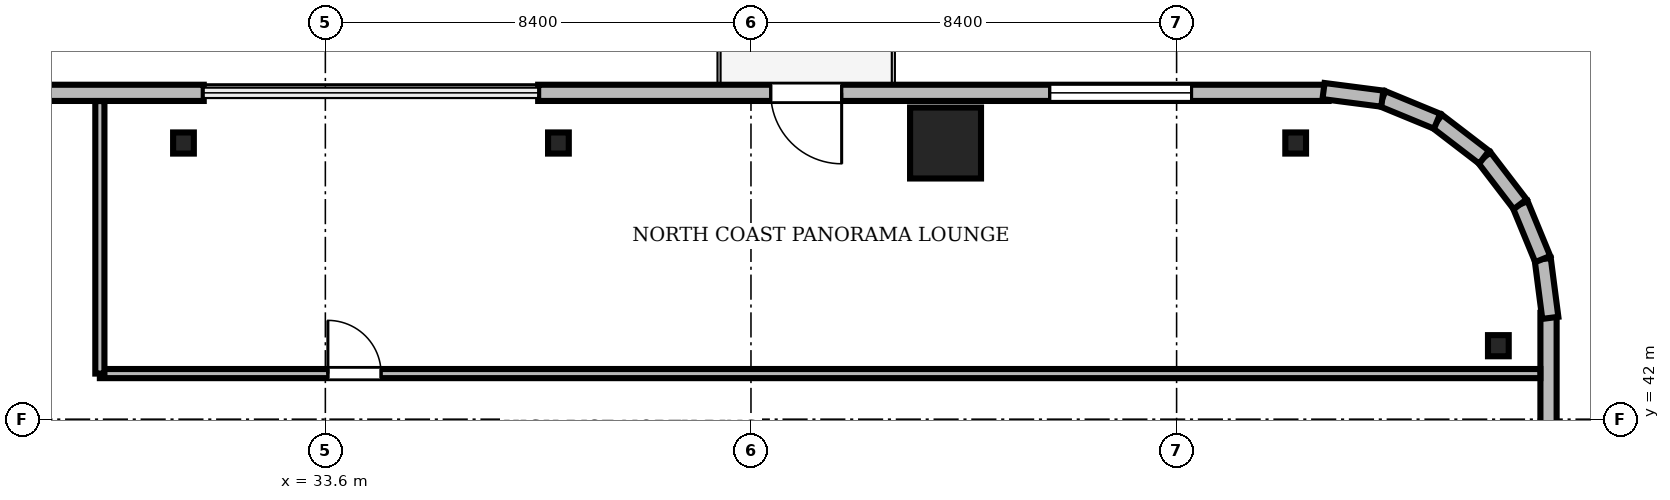
"""IFC4 building model, lengths in metres.
Left out: names, types, materials, properties, quantities, classifications, styles, units other than length and angle.
Written with IfcOpenShell. Run it as: python <this file> out.ifc"""

import sys

from ifc_helpers import new_model, si_unit, direction, frame, frame_2d, origin, origin_2d, place, context, subcontext, project, spatial, rectangle, i_section, extrude, source, transform, mapped, element, fill, save


model = new_model("IFC4")
c1 = context("Model", 3, precision=1e-05, world=origin(), true_north=direction((0.0, 1.0)))
c2 = subcontext(c1, "Body", "Model", "MODEL_VIEW")
j1 = project(units=[si_unit("LENGTHUNIT", "METRE"), si_unit("PLANEANGLEUNIT", "RADIAN")], contexts=[c1])
p1 = place(None, origin())
s1 = spatial("IfcSite", under=j1, at=p1, CompositionType="ELEMENT")
p2 = place(p1, origin())
s2 = spatial("IfcBuilding", under=s1, at=p2, CompositionType="ELEMENT")
p3 = place(p2, frame((0.0, 0.0, 196.05)))
s3 = spatial("IfcBuildingStorey", under=s2, at=p3, CompositionType="ELEMENT", Elevation=196.05)
m1 = source(origin(), c2, "Body", "SweptSolid", [
    extrude(rectangle(XDim=1.4, YDim=1.4, at=origin_2d()), origin(), (0.0, 0.0, 1.0), 3.53),
])
p4 = place(p3, frame((45.84, 47.45, 0.0), z_axis=(0.0, 0.0, 1.0), x_axis=(1.0, 0.0, 0.0)))
e1 = element("IfcColumn", 1, at=p4, inside=s3, PredefinedType="COLUMN", context=c2, shape_type="MappedRepresentation", body=[
    mapped(m1, transform((0.0, 0.0, 0.0), scale=1.0)),
])
m2 = source(origin(), c2, "Body", "SweptSolid", [
    extrude(i_section(OverallWidth=0.409, OverallDepth=0.417, WebThickness=0.021, FlangeThickness=0.033, FilletRadius=0.015, at=origin_2d()), origin(), (0.0, 0.0, 1.0), 3.53),
])
for number, where, z_axis, x_axis in (
    (2, (56.75, 43.45, 0.0), (0.0, 0.0, 1.0), (1.0, 0.0, 0.0)),
    (3, (52.75, 47.45, 0.0), (0.0, 0.0, 1.0), (1.0, 0.0, 0.0)),
    (4, (38.2, 47.45, 0.0), (0.0, 0.0, 1.0), (1.0, 0.0, 0.0)),
    (5, (30.8, 47.45, 0.0), (0.0, 0.0, 1.0), (1.0, 0.0, 0.0)),
):
    element("IfcColumn", number, at=place(p3, frame(where, z_axis=z_axis, x_axis=x_axis)), inside=s3, PredefinedType="COLUMN", context=c2, shape_type="MappedRepresentation", body=[
        mapped(m2, transform((0.0, 0.0, 0.0), scale=1.0)),
    ])
m3 = source(origin(), c2, "Body", "SweptSolid", [
    extrude(rectangle(XDim=15.6, YDim=0.32, at=frame_2d((7.8, 0.0))), origin(), (0.0, 0.0, 1.0), 3.53),
])
p5 = place(p3, frame((53.4, 48.44, 0.0), z_axis=(0.0, 0.0, 1.0), x_axis=(-1.0, 0.0, 0.0)))
e6 = element("IfcWall", 6, at=p5, inside=s3, PredefinedType="SOLIDWALL", context=c2, shape_type="MappedRepresentation", body=[
    mapped(m3, transform((0.0, 0.0, 0.0), scale=1.0)),
])
m4 = source(origin(), c2, "Body", "SweptSolid", [
    extrude(rectangle(XDim=1.4, YDim=2.3, at=frame_2d((0.7, 1.15))), frame((0.0, 0.17, 0.0), z_axis=(0.0, -1.0, 0.0), x_axis=(1.0, 0.0, 0.0)), (0.0, 0.0, 1.0), 0.34),
])
p6 = place(p5, frame((9.61, 0.0, 0.0)))
e7 = element("IfcOpeningElement", 7, at=p6, cuts=e6, PredefinedType="OPENING", context=c2, shape_type="MappedRepresentation", body=[
    mapped(m4, transform((0.0, 0.0, 0.0), scale=1.0)),
])
m5 = source(origin(), c2, "Body", "SweptSolid", [
    extrude(rectangle(XDim=2.8, YDim=2.4, at=frame_2d((1.4, 1.2))), frame((0.0, 0.17, 0.0), z_axis=(0.0, -1.0, 0.0), x_axis=(1.0, 0.0, 0.0)), (0.0, 0.0, 1.0), 0.34),
])
p7 = place(p5, frame((2.705, 0.0, 0.72)))
e8 = element("IfcOpeningElement", 8, at=p7, cuts=e6, PredefinedType="OPENING", context=c2, shape_type="MappedRepresentation", body=[
    mapped(m5, transform((0.0, 0.0, 0.0), scale=1.0)),
])
p8 = place(p3, frame((31.2, 48.44, 0.0), z_axis=(0.0, 0.0, 1.0), x_axis=(-1.0, 0.0, 0.0)))
e9 = element("IfcWall", 9, at=p8, inside=s3, PredefinedType="SOLIDWALL", context=c2, shape_type="MappedRepresentation", body=[
    mapped(m3, transform((0.0, 0.0, 0.0), scale=1.0)),
])
p9 = place(p8, frame((10.095, 0.0, 0.72)))
e10 = element("IfcOpeningElement", 10, at=p9, cuts=e9, PredefinedType="OPENING", context=c2, shape_type="MappedRepresentation", body=[
    mapped(m5, transform((0.0, 0.0, 0.0), scale=1.0)),
])
m6 = source(origin(), c2, "Body", "SweptSolid", [
    extrude(rectangle(XDim=15.6, YDim=0.32, at=frame_2d((7.8, 0.0))), origin(), (0.0, 0.0, 1.0), 3.53),
])
p10 = place(p3, frame((57.74, 28.5, 0.0), z_axis=(0.0, 0.0, 1.0), x_axis=(0.0, 1.0, 0.0)))
e11 = element("IfcWall", 11, at=p10, inside=s3, PredefinedType="SOLIDWALL", context=c2, shape_type="MappedRepresentation", body=[
    mapped(m6, transform((0.0, 0.0, 0.0), scale=1.0)),
])
p11 = place(p10, frame((10.095, 0.0, 0.72)))
e12 = element("IfcOpeningElement", 12, at=p11, cuts=e11, PredefinedType="OPENING", context=c2, shape_type="MappedRepresentation", body=[
    mapped(m5, transform((0.0, 0.0, 0.0), scale=1.0)),
])
m7 = source(origin(), c2, "Body", "SweptSolid", [
    extrude(rectangle(XDim=1.17, YDim=0.32, at=frame_2d((0.585, 0.0))), origin(), (0.0, 0.0, 1.0), 3.53),
])
p12 = place(p3, frame((57.776, 44.0, 0.0), z_axis=(0.0, 0.0, 1.0), x_axis=(-0.128295670475, 0.991735963317, 0.0)))
e13 = element("IfcWall", 13, at=p12, inside=s3, PredefinedType="SOLIDWALL", context=c2, shape_type="MappedRepresentation", body=[
    mapped(m7, transform((0.0, 0.0, 0.0), scale=1.0)),
])
m8 = source(origin(), c2, "Body", "SweptSolid", [
    extrude(rectangle(XDim=1.169, YDim=0.32, at=frame_2d((0.584, 0.0))), origin(), (0.0, 0.0, 1.0), 3.53),
])
p13 = place(p3, frame((57.625, 45.16, 0.0), z_axis=(0.0, 0.0, 1.0), x_axis=(-0.381054331552, 0.924552646638, 0.0)))
e14 = element("IfcWall", 14, at=p13, inside=s3, PredefinedType="SOLIDWALL", context=c2, shape_type="MappedRepresentation", body=[
    mapped(m8, transform((0.0, 0.0, 0.0), scale=1.0)),
])
m9 = source(origin(), c2, "Body", "SweptSolid", [
    extrude(rectangle(XDim=1.169, YDim=0.32, at=frame_2d((0.584, 0.0))), origin(), (0.0, 0.0, 1.0), 3.53),
])
p14 = place(p3, frame((57.18, 46.241, 0.0), z_axis=(0.0, 0.0, 1.0), x_axis=(-0.608387696831, 0.793639975269, 0.0)))
e15 = element("IfcWall", 15, at=p14, inside=s3, PredefinedType="SOLIDWALL", context=c2, shape_type="MappedRepresentation", body=[
    mapped(m9, transform((0.0, 0.0, 0.0), scale=1.0)),
])
m10 = source(origin(), c2, "Body", "SweptSolid", [
    extrude(rectangle(XDim=1.169, YDim=0.32, at=frame_2d((0.584, 0.0))), origin(), (0.0, 0.0, 1.0), 3.53),
])
p15 = place(p3, frame((56.469, 47.169, 0.0), z_axis=(0.0, 0.0, 1.0), x_axis=(-0.793663520347, 0.608356981114, 0.0)))
e16 = element("IfcWall", 16, at=p15, inside=s3, PredefinedType="SOLIDWALL", context=c2, shape_type="MappedRepresentation", body=[
    mapped(m10, transform((0.0, 0.0, 0.0), scale=1.0)),
])
p16 = place(p3, frame((55.541, 47.88, 0.0), z_axis=(0.0, 0.0, 1.0), x_axis=(-0.924552646638, 0.381054331552, 0.0)))
e17 = element("IfcWall", 17, at=p16, inside=s3, PredefinedType="SOLIDWALL", context=c2, shape_type="MappedRepresentation", body=[
    mapped(m8, transform((0.0, 0.0, 0.0), scale=1.0)),
])
p17 = place(p3, frame((54.46, 48.325, 0.0), z_axis=(0.0, 0.0, 1.0), x_axis=(-0.991735963317, 0.128295670475, 0.0)))
e18 = element("IfcWall", 18, at=p17, inside=s3, PredefinedType="SOLIDWALL", context=c2, shape_type="MappedRepresentation", body=[
    mapped(m7, transform((0.0, 0.0, 0.0), scale=1.0)),
])
m11 = source(origin(), c2, "Body", "SweptSolid", [
    extrude(rectangle(XDim=28.428, YDim=0.18, at=frame_2d((14.214, 0.0))), origin(), (0.0, 0.0, 1.0), 2.772),
])
p18 = place(p3, frame((29.15, 42.9, 0.0), z_axis=(0.0, 0.0, 1.0), x_axis=(1.0, 0.0, 0.0)))
e19 = element("IfcWall", 19, at=p18, inside=s3, PredefinedType="PARTITIONING", context=c2, shape_type="MappedRepresentation", body=[
    mapped(m11, transform((0.0, 0.0, 0.0), scale=1.0)),
])
m12 = source(origin(), c2, "Body", "SweptSolid", [
    extrude(rectangle(XDim=1.05, YDim=2.2, at=frame_2d((0.525, 1.1))), frame((0.0, 0.1, 0.0), z_axis=(0.0, -1.0, 0.0), x_axis=(1.0, 0.0, 0.0)), (0.0, 0.0, 1.0), 0.2),
])
p19 = place(p18, frame((4.5, 0.0, 0.0)))
e20 = element("IfcOpeningElement", 20, at=p19, cuts=e19, PredefinedType="OPENING", context=c2, shape_type="MappedRepresentation", body=[
    mapped(m12, transform((0.0, 0.0, 0.0), scale=1.0)),
])
m13 = source(origin(), c2, "Body", "SweptSolid", [
    extrude(rectangle(XDim=5.378, YDim=0.18, at=frame_2d((2.689, 0.0))), origin(), (0.0, 0.0, 1.0), 2.772),
])
p20 = place(p3, frame((29.15, 42.9, 0.0), z_axis=(0.0, 0.0, 1.0), x_axis=(0.0, 1.0, 0.0)))
e21 = element("IfcWall", 21, at=p20, inside=s3, PredefinedType="PARTITIONING", context=c2, shape_type="MappedRepresentation", body=[
    mapped(m13, transform((0.0, 0.0, 0.0), scale=1.0)),
])
m14 = source(origin(), c2, "Body", "SweptSolid", [
    extrude(rectangle(XDim=1.4, YDim=2.3, at=frame_2d((0.7, 1.15))), frame((0.0, 0.025, 0.0), z_axis=(0.0, -1.0, 0.0), x_axis=(1.0, 0.0, 0.0)), (0.0, 0.0, 1.0), 0.05),
])
p21 = place(p6, frame((1.4, 0.0, 0.0), z_axis=(0.0, 0.0, 1.0), x_axis=(-1.0, 0.0, 0.0)))
e22 = element("IfcDoor", 22, at=p21, inside=s3, OperationType="DOUBLE_DOOR_SLIDING", PredefinedType="DOOR", context=c2, shape_type="MappedRepresentation", body=[
    mapped(m14, transform((0.0, 0.0, 0.0), scale=1.0)),
])
fill(e7, e22)
m15 = source(origin(), c2, "Body", "SweptSolid", [
    extrude(rectangle(XDim=2.8, YDim=2.4, at=frame_2d((1.4, 1.2))), frame((0.0, 0.03, 0.0), z_axis=(0.0, -1.0, 0.0), x_axis=(1.0, 0.0, 0.0)), (0.0, 0.0, 1.0), 0.06),
])
p22 = place(p7, origin())
e23 = element("IfcWindow", 23, at=p22, inside=s3, PartitioningType="SINGLE_PANEL", PredefinedType="WINDOW", context=c2, shape_type="MappedRepresentation", body=[
    mapped(m15, transform((0.0, 0.0, 0.0), scale=1.0)),
])
fill(e8, e23)
m16 = source(origin(), c2, "Body", "SweptSolid", [
    extrude(rectangle(XDim=1.05, YDim=2.2, at=frame_2d((0.525, 1.1))), frame((0.0, 0.025, 0.0), z_axis=(0.0, -1.0, 0.0), x_axis=(1.0, 0.0, 0.0)), (0.0, 0.0, 1.0), 0.05),
])
p23 = place(p19, origin())
e24 = element("IfcDoor", 24, at=p23, inside=s3, OperationType="SINGLE_SWING_LEFT", PredefinedType="DOOR", context=c2, shape_type="MappedRepresentation", body=[
    mapped(m16, transform((0.0, 0.0, 0.0), scale=1.0)),
])
fill(e20, e24)
save(model, sys.argv[1])
